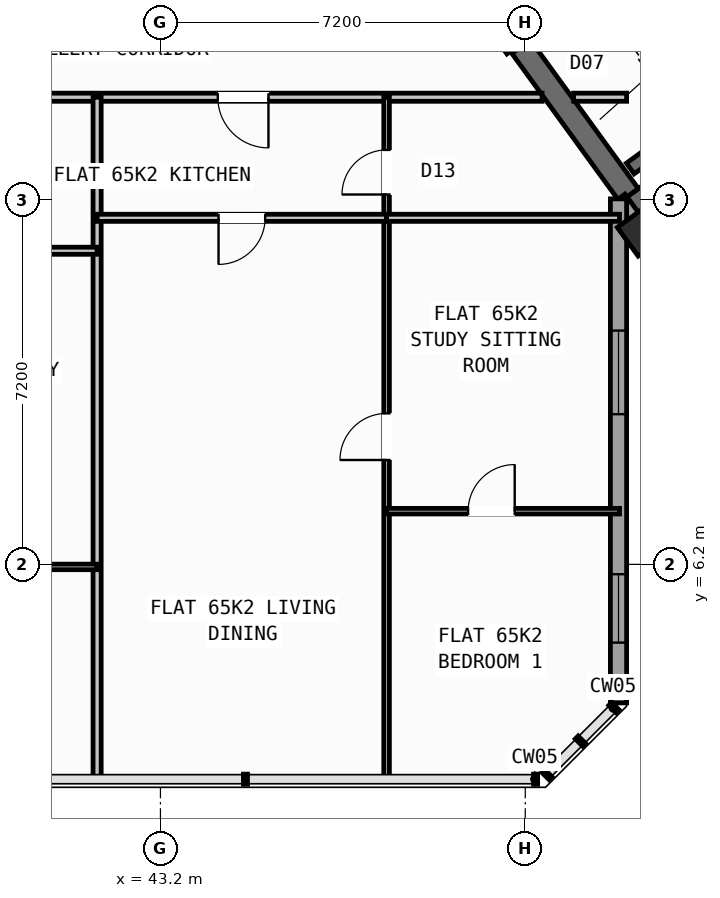
"""IFC4 building model, lengths in metres.
Left out: names, types, materials, properties, quantities, classifications, styles, units other than length and angle.
Written with IfcOpenShell. Run it as: python <this file> out.ifc"""

import sys

from ifc_helpers import new_model, si_unit, direction, frame, frame_2d, origin, origin_2d, place, context, subcontext, project, spatial, rectangle, hollow_rectangle, extrude, source, transform, mapped, element, fill, save


model = new_model("IFC4")
c1 = context("Model", 3, precision=1e-05, world=origin(), true_north=direction((0.0, 1.0)))
c2 = subcontext(c1, "Body", "Model", "MODEL_VIEW")
j1 = project(units=[si_unit("LENGTHUNIT", "METRE"), si_unit("PLANEANGLEUNIT", "RADIAN")], contexts=[c1])
p1 = place(None, origin())
s1 = spatial("IfcSite", under=j1, at=p1, CompositionType="ELEMENT")
p2 = place(p1, origin())
s2 = spatial("IfcBuilding", under=s1, at=p2, CompositionType="ELEMENT")
p3 = place(p2, frame((0.0, 0.0, 259.2)))
s3 = spatial("IfcBuildingStorey", under=s2, at=p3, CompositionType="ELEMENT", Elevation=259.2)
p4 = place(p3, frame((52.399, 13.169, 0.0), z_axis=(0.0, 0.0, 1.0), x_axis=(0.809022352778, 0.587777877013, 0.0)))
e1 = element("IfcWall", 1, at=p4, inside=s3, PredefinedType="SHEAR", context=c2, shape_type="SweptSolid", body=[
    extrude(rectangle(XDim=12.24, YDim=0.45, at=frame_2d((6.12, 0.0))), origin(), (0.0, 0.0, 1.0), 3.35),
])
p5 = place(p3, frame((52.449, 13.483, 0.0), z_axis=(0.0, 0.0, 1.0), x_axis=(-0.587819244441, 0.808992296542, 0.0)))
e2 = element("IfcWall", 2, at=p5, inside=s3, PredefinedType="SHEAR", context=c2, shape_type="SweptSolid", body=[
    extrude(rectangle(XDim=3.625, YDim=0.45, at=frame_2d((1.812, 0.0))), origin(), (0.0, 0.0, 1.0), 3.35),
])
m1 = source(origin(), c2, "Body", "SweptSolid", [
    extrude(hollow_rectangle(XDim=0.7, YDim=0.7, WallThickness=0.028, at=origin_2d()), origin(), (0.0, 0.0, 1.0), 3.6),
])
p6 = place(p3, frame((52.705, 12.773, 0.0), z_axis=(0.0, 0.0, 1.0), x_axis=(0.809016994375, 0.587785252292, 0.0)))
e3 = element("IfcColumn", 3, at=p6, inside=s3, PredefinedType="COLUMN", context=c2, shape_type="MappedRepresentation", body=[
    mapped(m1, transform((0.0, 0.0, 0.0), scale=1.0)),
])
p7 = place(p3, frame((56.581, 7.439, 0.0), z_axis=(0.0, 0.0, 1.0), x_axis=(-0.587776558368, 0.809023310809, 0.0)))
e4 = element("IfcWall", 4, at=p7, inside=s3, PredefinedType="STANDARD", context=c2, shape_type="SweptSolid", body=[
    extrude(rectangle(XDim=7.385, YDim=0.32, at=frame_2d((3.693, 0.0))), origin(), (0.0, 0.0, 1.0), 3.35),
])
p8 = place(p7, frame((1.731, 0.0, 0.9)))
e5 = element("IfcOpeningElement", 5, at=p8, cuts=e4, PredefinedType="OPENING", context=c2, shape_type="SweptSolid", body=[
    extrude(rectangle(XDim=1.65, YDim=1.45, at=frame_2d((0.825, 0.725))), frame((0.0, 0.17, 0.0), z_axis=(0.0, -1.0, 0.0), x_axis=(1.0, 0.0, 0.0)), (0.0, 0.0, 1.0), 0.34),
])
p9 = place(p3, frame((52.24, 13.414, 0.0), z_axis=(0.0, 0.0, 1.0), x_axis=(0.0, -1.0, 0.0)))
e6 = element("IfcWall", 6, at=p9, inside=s3, PredefinedType="STANDARD", context=c2, shape_type="SweptSolid", body=[
    extrude(rectangle(XDim=9.948, YDim=0.32, at=frame_2d((4.974, 0.0))), origin(), (0.0, 0.0, 1.0), 3.35),
])
p10 = place(p9, frame((2.6, 0.0, 0.9)))
e7 = element("IfcOpeningElement", 7, at=p10, cuts=e6, PredefinedType="OPENING", context=c2, shape_type="SweptSolid", body=[
    extrude(rectangle(XDim=1.65, YDim=1.45, at=frame_2d((0.825, 0.725))), frame((0.0, 0.17, 0.0), z_axis=(0.0, -1.0, 0.0), x_axis=(1.0, 0.0, 0.0)), (0.0, 0.0, 1.0), 0.34),
])
p11 = place(p9, frame((7.408, 0.0, 0.9)))
e8 = element("IfcOpeningElement", 8, at=p11, cuts=e6, PredefinedType="OPENING", context=c2, shape_type="SweptSolid", body=[
    extrude(rectangle(XDim=1.35, YDim=1.45, at=frame_2d((0.675, 0.725))), frame((0.0, 0.17, 0.0), z_axis=(0.0, -1.0, 0.0), x_axis=(1.0, 0.0, 0.0)), (0.0, 0.0, 1.0), 0.34),
])
p12 = place(p3, frame((52.472, 14.013, 0.0), z_axis=(0.0, 0.0, 1.0), x_axis=(0.809028366311, 0.587769599847, 0.0)))
e9 = element("IfcWall", 9, at=p12, inside=s3, PredefinedType="SHEAR", context=c2, shape_type="SweptSolid", body=[
    extrude(rectangle(XDim=7.33, YDim=0.26, at=frame_2d((3.665, 0.0))), origin(), (0.0, 0.0, 1.0), 3.35),
])
p13 = place(p3, frame((35.178, 15.42, 0.0), z_axis=(0.0, 0.0, 1.0), x_axis=(1.0, 0.0, 0.0)))
e10 = element("IfcWall", 10, at=p13, inside=s3, PredefinedType="PARTITIONING", context=c2, shape_type="SweptSolid", body=[
    extrude(rectangle(XDim=15.552, YDim=0.16, at=frame_2d((7.776, 0.0))), origin(), (0.0, 0.0, 1.0), 3.34),
])
p14 = place(p13, frame((0.733, 0.0, 0.0)))
e11 = element("IfcOpeningElement", 11, at=p14, cuts=e10, PredefinedType="OPENING", context=c2, shape_type="SweptSolid", body=[
    extrude(rectangle(XDim=1.0, YDim=2.1, at=frame_2d((0.5, 1.05))), frame((0.0, 0.09, 0.0), z_axis=(0.0, -1.0, 0.0), x_axis=(1.0, 0.0, 0.0)), (0.0, 0.0, 1.0), 0.18),
])
p15 = place(p13, frame((9.153, 0.0, 0.0)))
e12 = element("IfcOpeningElement", 12, at=p15, cuts=e10, PredefinedType="OPENING", context=c2, shape_type="SweptSolid", body=[
    extrude(rectangle(XDim=1.0, YDim=2.1, at=frame_2d((0.5, 1.05))), frame((0.0, 0.09, 0.0), z_axis=(0.0, -1.0, 0.0), x_axis=(1.0, 0.0, 0.0)), (0.0, 0.0, 1.0), 0.18),
])
p16 = place(p3, frame((51.354, 15.42, 0.0), z_axis=(0.0, 0.0, 1.0), x_axis=(1.0, 0.0, 0.0)))
e13 = element("IfcWall", 13, at=p16, inside=s3, PredefinedType="PARTITIONING", context=c2, shape_type="SweptSolid", body=[
    extrude(rectangle(XDim=1.046, YDim=0.16, at=frame_2d((0.523, 0.0))), origin(), (0.0, 0.0, 1.0), 3.34),
])
p17 = place(p3, frame((50.119, 16.333, 0.0), z_axis=(0.0, 0.0, 1.0), x_axis=(-0.587749856981, 0.809042709391, 0.0)))
e14 = element("IfcWall", 14, at=p17, inside=s3, PredefinedType="STANDARD", context=c2, shape_type="SweptSolid", body=[
    extrude(rectangle(XDim=2.96, YDim=0.2, at=frame_2d((1.48, 0.0))), origin(), (0.0, 0.0, 1.0), 3.34),
])
p18 = place(p17, frame((0.53, 0.0, 0.0)))
e15 = element("IfcOpeningElement", 15, at=p18, cuts=e14, PredefinedType="OPENING", context=c2, shape_type="SweptSolid", body=[
    extrude(rectangle(XDim=1.5, YDim=2.15, at=frame_2d((0.75, 1.075))), frame((0.0, 0.11, 0.0), z_axis=(0.0, -1.0, 0.0), x_axis=(1.0, 0.0, 0.0)), (0.0, 0.0, 1.0), 0.22),
])
p19 = place(p3, frame((41.95, 1.96, 0.0), z_axis=(0.0, 0.0, 1.0), x_axis=(0.0, 1.0, 0.0)))
e16 = element("IfcWall", 16, at=p19, inside=s3, PredefinedType="PARTITIONING", context=c2, shape_type="SweptSolid", body=[
    extrude(rectangle(XDim=13.46, YDim=0.16, at=frame_2d((6.73, 0.0))), origin(), (0.0, 0.0, 1.0), 3.34),
])
p20 = place(p3, frame((37.222, 12.39, 0.0), z_axis=(0.0, 0.0, 1.0), x_axis=(1.0, 0.0, 0.0)))
e17 = element("IfcWall", 17, at=p20, inside=s3, PredefinedType="PLUMBINGWALL", context=c2, shape_type="SweptSolid", body=[
    extrude(rectangle(XDim=4.728, YDim=0.14, at=frame_2d((2.364, 0.0))), origin(), (0.0, 0.0, 1.0), 3.34),
])
p21 = place(p3, frame((37.222, 6.15, 0.0), z_axis=(0.0, 0.0, 1.0), x_axis=(1.0, 0.0, 0.0)))
e18 = element("IfcWall", 18, at=p21, inside=s3, PredefinedType="PARTITIONING", context=c2, shape_type="SweptSolid", body=[
    extrude(rectangle(XDim=4.728, YDim=0.11, at=frame_2d((2.364, 0.0))), origin(), (0.0, 0.0, 1.0), 3.34),
])
p22 = place(p21, frame((1.904, 0.0, 0.0)))
e19 = element("IfcOpeningElement", 19, at=p22, cuts=e18, PredefinedType="OPENING", context=c2, shape_type="SweptSolid", body=[
    extrude(rectangle(XDim=0.92, YDim=2.08, at=frame_2d((0.46, 1.04))), frame((0.0, 0.065, 0.0), z_axis=(0.0, -1.0, 0.0), x_axis=(1.0, 0.0, 0.0)), (0.0, 0.0, 1.0), 0.13),
])
p23 = place(p3, frame((47.663, 1.96, 0.0), z_axis=(0.0, 0.0, 1.0), x_axis=(0.0, 1.0, 0.0)))
e20 = element("IfcWall", 20, at=p23, inside=s3, PredefinedType="PARTITIONING", context=c2, shape_type="SweptSolid", body=[
    extrude(rectangle(XDim=13.46, YDim=0.11, at=frame_2d((6.73, 0.0))), origin(), (0.0, 0.0, 1.0), 3.34),
])
p24 = place(p23, frame((6.3, 0.0, 0.0)))
e21 = element("IfcOpeningElement", 21, at=p24, cuts=e20, PredefinedType="OPENING", context=c2, shape_type="SweptSolid", body=[
    extrude(rectangle(XDim=0.92, YDim=2.08, at=frame_2d((0.46, 1.04))), frame((0.0, 0.065, 0.0), z_axis=(0.0, -1.0, 0.0), x_axis=(1.0, 0.0, 0.0)), (0.0, 0.0, 1.0), 0.13),
])
p25 = place(p23, frame((11.54, 0.0, 0.0)))
e22 = element("IfcOpeningElement", 22, at=p25, cuts=e20, PredefinedType="OPENING", context=c2, shape_type="SweptSolid", body=[
    extrude(rectangle(XDim=0.88, YDim=2.08, at=frame_2d((0.44, 1.04))), frame((0.0, 0.065, 0.0), z_axis=(0.0, -1.0, 0.0), x_axis=(1.0, 0.0, 0.0)), (0.0, 0.0, 1.0), 0.13),
])
p26 = place(p3, frame((41.95, 13.04, 0.0), z_axis=(0.0, 0.0, 1.0), x_axis=(1.0, 0.0, 0.0)))
e23 = element("IfcWall", 23, at=p26, inside=s3, PredefinedType="PLUMBINGWALL", context=c2, shape_type="SweptSolid", body=[
    extrude(rectangle(XDim=5.713, YDim=0.14, at=frame_2d((2.856, 0.0))), origin(), (0.0, 0.0, 1.0), 3.34),
])
p27 = place(p26, frame((2.396, 0.0, 0.0)))
e24 = element("IfcOpeningElement", 24, at=p27, cuts=e23, PredefinedType="OPENING", context=c2, shape_type="SweptSolid", body=[
    extrude(rectangle(XDim=0.92, YDim=2.08, at=frame_2d((0.46, 1.04))), frame((0.0, 0.08, 0.0), z_axis=(0.0, -1.0, 0.0), x_axis=(1.0, 0.0, 0.0)), (0.0, 0.0, 1.0), 0.16),
])
p28 = place(p3, frame((47.663, 13.04, 0.0), z_axis=(0.0, 0.0, 1.0), x_axis=(1.0, 0.0, 0.0)))
e25 = element("IfcWall", 25, at=p28, inside=s3, PredefinedType="PLUMBINGWALL", context=c2, shape_type="SweptSolid", body=[
    extrude(rectangle(XDim=4.597, YDim=0.14, at=frame_2d((2.298, 0.0))), origin(), (0.0, 0.0, 1.0), 3.34),
])
p29 = place(p3, frame((47.663, 7.25, 0.0), z_axis=(0.0, 0.0, 1.0), x_axis=(1.0, 0.0, 0.0)))
e26 = element("IfcWall", 26, at=p29, inside=s3, PredefinedType="PARTITIONING", context=c2, shape_type="SweptSolid", body=[
    extrude(rectangle(XDim=4.597, YDim=0.11, at=frame_2d((2.298, 0.0))), origin(), (0.0, 0.0, 1.0), 3.34),
])
p30 = place(p29, frame((1.608, 0.0, 0.0)))
e27 = element("IfcOpeningElement", 27, at=p30, cuts=e26, PredefinedType="OPENING", context=c2, shape_type="SweptSolid", body=[
    extrude(rectangle(XDim=0.92, YDim=2.08, at=frame_2d((0.46, 1.04))), frame((0.0, 0.065, 0.0), z_axis=(0.0, -1.0, 0.0), x_axis=(1.0, 0.0, 0.0)), (0.0, 0.0, 1.0), 0.13),
])
m2 = source(origin(), c2, "Body", "SweptSolid", [
    extrude(rectangle(XDim=1.65, YDim=1.45, at=frame_2d((0.825, 0.725))), frame((0.0, 0.03, 0.0), z_axis=(0.0, -1.0, 0.0), x_axis=(1.0, 0.0, 0.0)), (0.0, 0.0, 1.0), 0.06),
])
p31 = place(p10, origin())
e28 = element("IfcWindow", 28, at=p31, inside=s3, PartitioningType="SINGLE_PANEL", PredefinedType="WINDOW", context=c2, shape_type="MappedRepresentation", body=[
    mapped(m2, transform((0.0, 0.0, 0.0), scale=1.0)),
])
fill(e7, e28)
m3 = source(origin(), c2, "Body", "SweptSolid", [
    extrude(rectangle(XDim=1.35, YDim=1.45, at=frame_2d((0.675, 0.725))), frame((0.0, 0.03, 0.0), z_axis=(0.0, -1.0, 0.0), x_axis=(1.0, 0.0, 0.0)), (0.0, 0.0, 1.0), 0.06),
])
p32 = place(p11, origin())
e29 = element("IfcWindow", 29, at=p32, inside=s3, PartitioningType="SINGLE_PANEL", PredefinedType="WINDOW", context=c2, shape_type="MappedRepresentation", body=[
    mapped(m3, transform((0.0, 0.0, 0.0), scale=1.0)),
])
fill(e8, e29)
m4 = source(origin(), c2, "Body", "SweptSolid", [
    extrude(rectangle(XDim=0.92, YDim=2.08, at=frame_2d((0.46, 1.04))), frame((0.0, 0.025, 0.0), z_axis=(0.0, -1.0, 0.0), x_axis=(1.0, 0.0, 0.0)), (0.0, 0.0, 1.0), 0.05),
])
p33 = place(p24, origin())
e30 = element("IfcDoor", 30, at=p33, inside=s3, OperationType="SINGLE_SWING_LEFT", PredefinedType="DOOR", context=c2, shape_type="MappedRepresentation", body=[
    mapped(m4, transform((0.0, 0.0, 0.0), scale=1.0)),
])
fill(e21, e30)
p34 = place(p30, origin())
e31 = element("IfcDoor", 31, at=p34, inside=s3, OperationType="SINGLE_SWING_RIGHT", PredefinedType="DOOR", context=c2, shape_type="MappedRepresentation", body=[
    mapped(m4, transform((0.0, 0.0, 0.0), scale=1.0)),
])
fill(e27, e31)
m5 = source(origin(), c2, "Body", "SweptSolid", [
    extrude(rectangle(XDim=1.0, YDim=2.1, at=frame_2d((0.5, 1.05))), frame((0.0, 0.025, 0.0), z_axis=(0.0, -1.0, 0.0), x_axis=(1.0, 0.0, 0.0)), (0.0, 0.0, 1.0), 0.05),
])
p35 = place(p15, frame((1.0, 0.0, 0.0), z_axis=(0.0, 0.0, 1.0), x_axis=(-1.0, 0.0, 0.0)))
e32 = element("IfcDoor", 32, at=p35, inside=s3, OperationType="SINGLE_SWING_LEFT", PredefinedType="DOOR", context=c2, shape_type="MappedRepresentation", body=[
    mapped(m5, transform((0.0, 0.0, 0.0), scale=1.0)),
])
fill(e12, e32)
p36 = place(p27, frame((0.92, 0.0, 0.0), z_axis=(0.0, 0.0, 1.0), x_axis=(-1.0, 0.0, 0.0)))
e33 = element("IfcDoor", 33, at=p36, inside=s3, OperationType="SINGLE_SWING_RIGHT", PredefinedType="DOOR", context=c2, shape_type="MappedRepresentation", body=[
    mapped(m4, transform((0.0, 0.0, 0.0), scale=1.0)),
])
fill(e24, e33)
m6 = source(origin(), c2, "Body", "SweptSolid", [
    extrude(rectangle(XDim=0.88, YDim=2.08, at=frame_2d((0.44, 1.04))), frame((0.0, 0.025, 0.0), z_axis=(0.0, -1.0, 0.0), x_axis=(1.0, 0.0, 0.0)), (0.0, 0.0, 1.0), 0.05),
])
p37 = place(p25, origin())
e34 = element("IfcDoor", 34, at=p37, inside=s3, OperationType="SINGLE_SWING_LEFT", PredefinedType="DOOR", context=c2, shape_type="MappedRepresentation", body=[
    mapped(m6, transform((0.0, 0.0, 0.0), scale=1.0)),
])
fill(e22, e34)
save(model, sys.argv[1])
